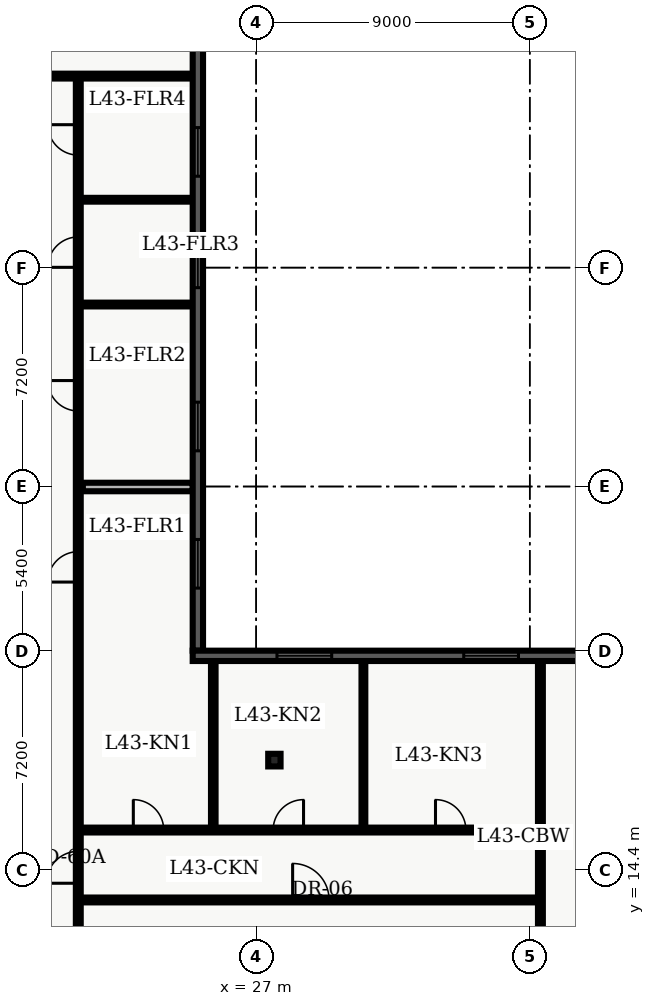
"""IFC4 building model, lengths in metres.
Left out: names, types, materials, properties, quantities, classifications, styles, units other than length and angle.
Written with IfcOpenShell. Run it as: python <this file> out.ifc"""

import sys

from ifc_helpers import new_model, entity, si_unit, converted_unit, direction, frame, origin_with_axes, origin_2d_with_axis, place, context, subcontext, project, spatial, polyline, rectangle, i_section, outline, extrude, element, fill, save


model = new_model("IFC4")
c1 = context("Model", 3, precision=1e-05, world=origin_with_axes(), true_north=direction((0.0, 1.0)))
c2 = subcontext(c1, "Body", "Model", "MODEL_VIEW")
j1 = project(units=[si_unit("LENGTHUNIT", "METRE"), converted_unit("PLANEANGLEUNIT", "DEGREE", entity("IfcPlaneAngleMeasure", 0.017), si_unit("PLANEANGLEUNIT", "RADIAN"), dimensions=[0, 0, 0, 0, 0, 0, 0])], contexts=[c1])
p1 = place(None, origin_with_axes())
s1 = spatial("IfcSite", under=j1, at=p1, CompositionType="ELEMENT")
p2 = place(p1, origin_with_axes())
s2 = spatial("IfcBuilding", under=s1, at=p2, CompositionType="ELEMENT")
p3 = place(p2, frame((0.0, 0.0, 175.8), z_axis=(0.0, 0.0, 1.0), x_axis=(1.0, 0.0, 0.0)))
s3 = spatial("IfcBuildingStorey", under=s2, at=p3, CompositionType="ELEMENT", Elevation=175.8)
p4 = place(p3, frame((27.6, 18.0, 0.0), z_axis=(0.0, 0.0, 1.0), x_axis=(1.0, 0.0, 0.0)))
e1 = element("IfcColumn", 1, at=p4, inside=s3, PredefinedType="COLUMN", context=c2, shape_type="SweptSolid", body=[
    extrude(i_section(OverallWidth=0.406, OverallDepth=0.416, WebThickness=0.03, FlangeThickness=0.048, FilletRadius=0.022, at=origin_2d_with_axis()), origin_with_axes(), (0.0, 0.0, 1.0), 3.9),
])
p5 = place(p3, frame((2.6, 40.5, 0.0), z_axis=(0.0, 0.0, 1.0), x_axis=(1.0, 0.0, 0.0)))
e2 = element("IfcWall", 2, at=p5, inside=s3, PredefinedType="PARTITIONING", context=c2, shape_type="SweptSolid", body=[
    extrude(outline(polyline([(0.0, -0.08), (22.318, -0.08), (22.318, 0.08), (0.0, 0.08), (0.0, -0.08)])), origin_with_axes(), (0.0, 0.0, 1.0), 2.7),
])
p6 = place(p5, frame((2.368, 0.0, 0.0), z_axis=(0.0, 0.0, 1.0), x_axis=(1.0, 0.0, 0.0)))
e3 = element("IfcOpeningElement", 3, at=p6, cuts=e2, PredefinedType="OPENING", context=c2, shape_type="SweptSolid", body=[
    extrude(rectangle(XDim=1.0, YDim=0.18, at=origin_2d_with_axis()), origin_with_axes(), (0.0, 0.0, 1.0), 2.15),
])
p7 = place(p5, frame((7.617, 0.0, 0.0), z_axis=(0.0, 0.0, 1.0), x_axis=(1.0, 0.0, 0.0)))
e4 = element("IfcOpeningElement", 4, at=p7, cuts=e2, PredefinedType="OPENING", context=c2, shape_type="SweptSolid", body=[
    extrude(rectangle(XDim=1.0, YDim=0.18, at=origin_2d_with_axis()), origin_with_axes(), (0.0, 0.0, 1.0), 2.15),
])
p8 = place(p5, frame((14.004, 0.0, 0.0), z_axis=(0.0, 0.0, 1.0), x_axis=(1.0, 0.0, 0.0)))
e5 = element("IfcOpeningElement", 5, at=p8, cuts=e2, PredefinedType="OPENING", context=c2, shape_type="SweptSolid", body=[
    extrude(rectangle(XDim=1.0, YDim=0.18, at=origin_2d_with_axis()), origin_with_axes(), (0.0, 0.0, 1.0), 2.15),
])
p9 = place(p3, frame((21.15, 7.8, 0.0), z_axis=(0.0, 0.0, 1.0), x_axis=(0.0, 1.0, 0.0)))
e6 = element("IfcWall", 6, at=p9, inside=s3, PredefinedType="PARTITIONING", context=c2, shape_type="SweptSolid", body=[
    extrude(outline(polyline([(0.0, -0.08), (32.7, -0.08), (32.7, 0.08), (0.0, 0.08), (0.0, -0.08)])), origin_with_axes(), (0.0, 0.0, 1.0), 2.7),
])
p10 = place(p9, frame((16.557, 0.0, 0.0), z_axis=(0.0, 0.0, 1.0), x_axis=(1.0, 0.0, 0.0)))
e7 = element("IfcOpeningElement", 7, at=p10, cuts=e6, PredefinedType="OPENING", context=c2, shape_type="SweptSolid", body=[
    extrude(rectangle(XDim=1.0, YDim=0.18, at=origin_2d_with_axis()), origin_with_axes(), (0.0, 0.0, 1.0), 2.15),
])
p11 = place(p9, frame((22.185, 0.0, 0.0), z_axis=(0.0, 0.0, 1.0), x_axis=(1.0, 0.0, 0.0)))
e8 = element("IfcOpeningElement", 8, at=p11, cuts=e6, PredefinedType="OPENING", context=c2, shape_type="SweptSolid", body=[
    extrude(rectangle(XDim=1.0, YDim=0.18, at=origin_2d_with_axis()), origin_with_axes(), (0.0, 0.0, 1.0), 2.15),
])
p12 = place(p9, frame((26.91, 0.0, 0.0), z_axis=(0.0, 0.0, 1.0), x_axis=(1.0, 0.0, 0.0)))
e9 = element("IfcOpeningElement", 9, at=p12, cuts=e6, PredefinedType="OPENING", context=c2, shape_type="SweptSolid", body=[
    extrude(rectangle(XDim=1.0, YDim=0.18, at=origin_2d_with_axis()), origin_with_axes(), (0.0, 0.0, 1.0), 2.15),
])
p13 = place(p9, frame((30.602, 0.0, 0.0), z_axis=(0.0, 0.0, 1.0), x_axis=(1.0, 0.0, 0.0)))
e10 = element("IfcOpeningElement", 10, at=p13, cuts=e6, PredefinedType="OPENING", context=c2, shape_type="SweptSolid", body=[
    extrude(rectangle(XDim=1.0, YDim=0.18, at=origin_2d_with_axis()), origin_with_axes(), (0.0, 0.0, 1.0), 2.15),
])
p14 = place(p9, frame((6.675, 0.0, 0.0), z_axis=(0.0, 0.0, 1.0), x_axis=(1.0, 0.0, 0.0)))
e11 = element("IfcOpeningElement", 11, at=p14, cuts=e6, PredefinedType="OPENING", context=c2, shape_type="SweptSolid", body=[
    extrude(rectangle(XDim=1.05, YDim=0.18, at=origin_2d_with_axis()), origin_with_axes(), (0.0, 0.0, 1.0), 2.15),
])
p15 = place(p3, frame((21.3, 26.984, 0.0), z_axis=(0.0, 0.0, 1.0), x_axis=(1.0, 0.0, 0.0)))
e12 = element("IfcWall", 12, at=p15, inside=s3, PredefinedType="PARTITIONING", context=c2, shape_type="SweptSolid", body=[
    extrude(outline(polyline([(0.0, -0.14), (3.618, -0.14), (3.618, 0.14), (0.0, 0.14), (0.0, -0.14)])), origin_with_axes(), (0.0, 0.0, 1.0), 2.7),
])
for number, where, z_axis, x_axis in (
    (13, (21.3, 32.986, 0.0), (0.0, 0.0, 1.0), (1.0, 0.0, 0.0)),
    (14, (21.3, 36.433, 0.0), (0.0, 0.0, 1.0), (1.0, 0.0, 0.0)),
):
    element("IfcWall", number, at=place(p3, frame(where, z_axis=z_axis, x_axis=x_axis)), inside=s3, PredefinedType="PARTITIONING", context=c2, shape_type="SweptSolid", body=[
        extrude(outline(polyline([(0.0, -0.062), (3.618, -0.062), (3.618, 0.062), (0.0, 0.062), (0.0, -0.062)])), origin_with_axes(), (0.0, 0.0, 1.0), 2.7),
    ])
p16 = place(p3, frame((21.15, 13.4, 0.0), z_axis=(0.0, 0.0, 1.0), x_axis=(1.0, 0.0, 0.0)))
e15 = element("IfcWall", 15, at=p16, inside=s3, PredefinedType="PARTITIONING", context=c2, shape_type="SweptSolid", body=[
    extrude(outline(polyline([(0.0, -0.08), (15.2, -0.08), (15.2, 0.08), (0.0, 0.08), (0.0, -0.08)])), origin_with_axes(), (0.0, 0.0, 1.0), 2.7),
])
p17 = place(p16, frame((7.65, 0.0, 0.0), z_axis=(0.0, 0.0, 1.0), x_axis=(1.0, 0.0, 0.0)))
e16 = element("IfcOpeningElement", 16, at=p17, cuts=e15, PredefinedType="OPENING", context=c2, shape_type="SweptSolid", body=[
    extrude(rectangle(XDim=1.2, YDim=0.18, at=origin_2d_with_axis()), origin_with_axes(), (0.0, 0.0, 1.0), 2.2),
])
p18 = place(p3, frame((21.15, 15.7, 0.0), z_axis=(0.0, 0.0, 1.0), x_axis=(1.0, 0.0, 0.0)))
e17 = element("IfcWall", 17, at=p18, inside=s3, PredefinedType="PARTITIONING", context=c2, shape_type="SweptSolid", body=[
    extrude(outline(polyline([(0.0, -0.08), (15.2, -0.08), (15.2, 0.08), (0.0, 0.08), (0.0, -0.08)])), origin_with_axes(), (0.0, 0.0, 1.0), 2.7),
])
p19 = place(p18, frame((2.31, 0.0, 0.0), z_axis=(0.0, 0.0, 1.0), x_axis=(1.0, 0.0, 0.0)))
e18 = element("IfcOpeningElement", 18, at=p19, cuts=e17, PredefinedType="OPENING", context=c2, shape_type="SweptSolid", body=[
    extrude(rectangle(XDim=1.0, YDim=0.18, at=origin_2d_with_axis()), origin_with_axes(), (0.0, 0.0, 1.0), 2.15),
])
p20 = place(p18, frame((6.909, 0.0, 0.0), z_axis=(0.0, 0.0, 1.0), x_axis=(1.0, 0.0, 0.0)))
e19 = element("IfcOpeningElement", 19, at=p20, cuts=e17, PredefinedType="OPENING", context=c2, shape_type="SweptSolid", body=[
    extrude(rectangle(XDim=1.0, YDim=0.18, at=origin_2d_with_axis()), origin_with_axes(), (0.0, 0.0, 1.0), 2.15),
])
p21 = place(p18, frame((12.249, 0.0, 0.0), z_axis=(0.0, 0.0, 1.0), x_axis=(1.0, 0.0, 0.0)))
e20 = element("IfcOpeningElement", 20, at=p21, cuts=e17, PredefinedType="OPENING", context=c2, shape_type="SweptSolid", body=[
    extrude(rectangle(XDim=1.0, YDim=0.18, at=origin_2d_with_axis()), origin_with_axes(), (0.0, 0.0, 1.0), 2.15),
])
p22 = place(p3, frame((36.35, 4.35, 0.0), z_axis=(0.0, 0.0, 1.0), x_axis=(0.0, 1.0, 0.0)))
e21 = element("IfcWall", 21, at=p22, inside=s3, PredefinedType="PARTITIONING", context=c2, shape_type="SweptSolid", body=[
    extrude(outline(polyline([(0.0, -0.08), (16.95, -0.08), (16.95, 0.08), (0.0, 0.08), (0.0, -0.08)])), origin_with_axes(), (0.0, 0.0, 1.0), 2.7),
])
p23 = place(p3, frame((25.59, 15.82, 0.0), z_axis=(0.0, 0.0, 1.0), x_axis=(0.0, 1.0, 0.0)))
e22 = element("IfcWall", 22, at=p23, inside=s3, PredefinedType="PARTITIONING", context=c2, shape_type="SweptSolid", body=[
    extrude(outline(polyline([(0.0, -0.075), (5.445, -0.075), (5.445, 0.075), (0.0, 0.075), (0.0, -0.075)])), origin_with_axes(), (0.0, 0.0, 1.0), 2.7),
])
p24 = place(p3, frame((30.528, 15.82, 0.0), z_axis=(0.0, 0.0, 1.0), x_axis=(0.0, 1.0, 0.0)))
e23 = element("IfcWall", 23, at=p24, inside=s3, PredefinedType="PARTITIONING", context=c2, shape_type="SweptSolid", body=[
    extrude(outline(polyline([(0.0, -0.062), (5.445, -0.062), (5.445, 0.062), (0.0, 0.062), (0.0, -0.062)])), origin_with_axes(), (0.0, 0.0, 1.0), 2.7),
])
p25 = place(p3, frame((25.083, 45.38, 0.0), z_axis=(0.0, 0.0, 1.0), x_axis=(0.0, -1.0, 0.0)))
e24 = element("IfcWall", 24, at=p25, inside=s3, PredefinedType="SOLIDWALL", context=c2, shape_type="SweptSolid", body=[
    extrude(outline(polyline([(0.0, -0.17), (23.78, -0.17), (23.78, 0.17), (0.0, 0.17), (0.0, -0.17)])), origin_with_axes(), (0.0, 0.0, 1.0), 3.66),
])
p26 = place(p25, frame((2.858, 0.0, 0.45), z_axis=(0.0, 0.0, 1.0), x_axis=(1.0, 0.0, 0.0)))
e25 = element("IfcOpeningElement", 25, at=p26, cuts=e24, PredefinedType="OPENING", context=c2, shape_type="SweptSolid", body=[
    extrude(rectangle(XDim=1.6, YDim=0.36, at=origin_2d_with_axis()), origin_with_axes(), (0.0, 0.0, 1.0), 2.2),
])
p27 = place(p25, frame((7.374, 0.0, 0.45), z_axis=(0.0, 0.0, 1.0), x_axis=(1.0, 0.0, 0.0)))
e26 = element("IfcOpeningElement", 26, at=p27, cuts=e24, PredefinedType="OPENING", context=c2, shape_type="SweptSolid", body=[
    extrude(rectangle(XDim=1.6, YDim=0.36, at=origin_2d_with_axis()), origin_with_axes(), (0.0, 0.0, 1.0), 2.2),
])
p28 = place(p25, frame((11.04, 0.0, 0.45), z_axis=(0.0, 0.0, 1.0), x_axis=(1.0, 0.0, 0.0)))
e27 = element("IfcOpeningElement", 27, at=p28, cuts=e24, PredefinedType="OPENING", context=c2, shape_type="SweptSolid", body=[
    extrude(rectangle(XDim=1.6, YDim=0.36, at=origin_2d_with_axis()), origin_with_axes(), (0.0, 0.0, 1.0), 2.2),
])
p29 = place(p25, frame((16.406, 0.0, 0.45), z_axis=(0.0, 0.0, 1.0), x_axis=(1.0, 0.0, 0.0)))
e28 = element("IfcOpeningElement", 28, at=p29, cuts=e24, PredefinedType="OPENING", context=c2, shape_type="SweptSolid", body=[
    extrude(rectangle(XDim=1.6, YDim=0.36, at=origin_2d_with_axis()), origin_with_axes(), (0.0, 0.0, 1.0), 2.2),
])
p30 = place(p25, frame((20.922, 0.0, 0.45), z_axis=(0.0, 0.0, 1.0), x_axis=(1.0, 0.0, 0.0)))
e29 = element("IfcOpeningElement", 29, at=p30, cuts=e24, PredefinedType="OPENING", context=c2, shape_type="SweptSolid", body=[
    extrude(rectangle(XDim=1.6, YDim=0.36, at=origin_2d_with_axis()), origin_with_axes(), (0.0, 0.0, 1.0), 2.2),
])
p31 = place(p3, frame((24.913, 21.43, 0.0), z_axis=(0.0, 0.0, 1.0), x_axis=(1.0, 0.0, 0.0)))
e30 = element("IfcWall", 30, at=p31, inside=s3, PredefinedType="SOLIDWALL", context=c2, shape_type="SweptSolid", body=[
    extrude(outline(polyline([(0.0, -0.17), (13.487, -0.17), (13.487, 0.17), (0.0, 0.17), (0.0, -0.17)])), origin_with_axes(), (0.0, 0.0, 1.0), 3.66),
])
p32 = place(p31, frame((3.672, 0.0, 0.45), z_axis=(0.0, 0.0, 1.0), x_axis=(1.0, 0.0, 0.0)))
e31 = element("IfcOpeningElement", 31, at=p32, cuts=e30, PredefinedType="OPENING", context=c2, shape_type="SweptSolid", body=[
    extrude(rectangle(XDim=1.8, YDim=0.36, at=origin_2d_with_axis()), origin_with_axes(), (0.0, 0.0, 1.0), 2.1),
])
p33 = place(p31, frame((9.815, 0.0, 0.45), z_axis=(0.0, 0.0, 1.0), x_axis=(1.0, 0.0, 0.0)))
e32 = element("IfcOpeningElement", 32, at=p33, cuts=e30, PredefinedType="OPENING", context=c2, shape_type="SweptSolid", body=[
    extrude(rectangle(XDim=1.8, YDim=0.36, at=origin_2d_with_axis()), origin_with_axes(), (0.0, 0.0, 1.0), 2.1),
])
p34 = place(p9, frame((16.557, 0.0, 0.0), z_axis=(0.0, 0.0, 1.0), x_axis=(1.0, 0.0, 0.0)))
e33 = element("IfcDoor", 33, at=p34, inside=s3, OperationType="SINGLE_SWING_LEFT", PredefinedType="DOOR", context=c2, shape_type="SweptSolid", body=[
    extrude(rectangle(XDim=1.0, YDim=0.09, at=origin_2d_with_axis()), origin_with_axes(), (0.0, 0.0, 1.0), 2.15),
])
fill(e7, e33)
p35 = place(p9, frame((22.185, 0.0, 0.0), z_axis=(0.0, 0.0, 1.0), x_axis=(1.0, 0.0, 0.0)))
e34 = element("IfcDoor", 34, at=p35, inside=s3, OperationType="SINGLE_SWING_RIGHT", PredefinedType="DOOR", context=c2, shape_type="SweptSolid", body=[
    extrude(rectangle(XDim=1.0, YDim=0.09, at=origin_2d_with_axis()), origin_with_axes(), (0.0, 0.0, 1.0), 2.15),
])
fill(e8, e34)
p36 = place(p9, frame((26.91, 0.0, 0.0), z_axis=(0.0, 0.0, 1.0), x_axis=(1.0, 0.0, 0.0)))
e35 = element("IfcDoor", 35, at=p36, inside=s3, OperationType="SINGLE_SWING_LEFT", PredefinedType="DOOR", context=c2, shape_type="SweptSolid", body=[
    extrude(rectangle(XDim=1.0, YDim=0.09, at=origin_2d_with_axis()), origin_with_axes(), (0.0, 0.0, 1.0), 2.15),
])
fill(e9, e35)
p37 = place(p9, frame((30.602, 0.0, 0.0), z_axis=(0.0, 0.0, 1.0), x_axis=(1.0, 0.0, 0.0)))
e36 = element("IfcDoor", 36, at=p37, inside=s3, OperationType="SINGLE_SWING_RIGHT", PredefinedType="DOOR", context=c2, shape_type="SweptSolid", body=[
    extrude(rectangle(XDim=1.0, YDim=0.09, at=origin_2d_with_axis()), origin_with_axes(), (0.0, 0.0, 1.0), 2.15),
])
fill(e10, e36)
p38 = place(p9, frame((6.675, 0.0, 0.0), z_axis=(0.0, 0.0, 1.0), x_axis=(1.0, 0.0, 0.0)))
e37 = element("IfcDoor", 37, at=p38, inside=s3, OperationType="SINGLE_SWING_LEFT", PredefinedType="DOOR", context=c2, shape_type="SweptSolid", body=[
    extrude(rectangle(XDim=1.05, YDim=0.09, at=origin_2d_with_axis()), origin_with_axes(), (0.0, 0.0, 1.0), 2.15),
])
fill(e11, e37)
p39 = place(p16, frame((7.65, 0.0, 0.0), z_axis=(0.0, 0.0, 1.0), x_axis=(1.0, 0.0, 0.0)))
e38 = element("IfcDoor", 38, at=p39, inside=s3, OperationType="SINGLE_SWING_LEFT", PredefinedType="DOOR", context=c2, shape_type="SweptSolid", body=[
    extrude(rectangle(XDim=1.2, YDim=0.09, at=origin_2d_with_axis()), origin_with_axes(), (0.0, 0.0, 1.0), 2.2),
])
fill(e16, e38)
p40 = place(p18, frame((2.31, 0.0, 0.0), z_axis=(0.0, 0.0, 1.0), x_axis=(1.0, 0.0, 0.0)))
e39 = element("IfcDoor", 39, at=p40, inside=s3, OperationType="SINGLE_SWING_LEFT", PredefinedType="DOOR", context=c2, shape_type="SweptSolid", body=[
    extrude(rectangle(XDim=1.0, YDim=0.09, at=origin_2d_with_axis()), origin_with_axes(), (0.0, 0.0, 1.0), 2.15),
])
fill(e18, e39)
p41 = place(p18, frame((6.909, 0.0, 0.0), z_axis=(0.0, 0.0, 1.0), x_axis=(1.0, 0.0, 0.0)))
e40 = element("IfcDoor", 40, at=p41, inside=s3, OperationType="SINGLE_SWING_RIGHT", PredefinedType="DOOR", context=c2, shape_type="SweptSolid", body=[
    extrude(rectangle(XDim=1.0, YDim=0.09, at=origin_2d_with_axis()), origin_with_axes(), (0.0, 0.0, 1.0), 2.15),
])
fill(e19, e40)
p42 = place(p18, frame((12.249, 0.0, 0.0), z_axis=(0.0, 0.0, 1.0), x_axis=(1.0, 0.0, 0.0)))
e41 = element("IfcDoor", 41, at=p42, inside=s3, OperationType="SINGLE_SWING_LEFT", PredefinedType="DOOR", context=c2, shape_type="SweptSolid", body=[
    extrude(rectangle(XDim=1.0, YDim=0.09, at=origin_2d_with_axis()), origin_with_axes(), (0.0, 0.0, 1.0), 2.15),
])
fill(e20, e41)
p43 = place(p25, frame((7.374, 0.0, 0.45), z_axis=(0.0, 0.0, 1.0), x_axis=(1.0, 0.0, 0.0)))
e42 = element("IfcWindow", 42, at=p43, inside=s3, PredefinedType="WINDOW", context=c2, shape_type="SweptSolid", body=[
    extrude(rectangle(XDim=1.6, YDim=0.09, at=origin_2d_with_axis()), origin_with_axes(), (0.0, 0.0, 1.0), 2.2),
])
fill(e26, e42)
p44 = place(p25, frame((11.04, 0.0, 0.45), z_axis=(0.0, 0.0, 1.0), x_axis=(1.0, 0.0, 0.0)))
e43 = element("IfcWindow", 43, at=p44, inside=s3, PredefinedType="WINDOW", context=c2, shape_type="SweptSolid", body=[
    extrude(rectangle(XDim=1.6, YDim=0.09, at=origin_2d_with_axis()), origin_with_axes(), (0.0, 0.0, 1.0), 2.2),
])
fill(e27, e43)
p45 = place(p25, frame((16.406, 0.0, 0.45), z_axis=(0.0, 0.0, 1.0), x_axis=(1.0, 0.0, 0.0)))
e44 = element("IfcWindow", 44, at=p45, inside=s3, PredefinedType="WINDOW", context=c2, shape_type="SweptSolid", body=[
    extrude(rectangle(XDim=1.6, YDim=0.09, at=origin_2d_with_axis()), origin_with_axes(), (0.0, 0.0, 1.0), 2.2),
])
fill(e28, e44)
p46 = place(p25, frame((20.922, 0.0, 0.45), z_axis=(0.0, 0.0, 1.0), x_axis=(1.0, 0.0, 0.0)))
e45 = element("IfcWindow", 45, at=p46, inside=s3, PredefinedType="WINDOW", context=c2, shape_type="SweptSolid", body=[
    extrude(rectangle(XDim=1.6, YDim=0.09, at=origin_2d_with_axis()), origin_with_axes(), (0.0, 0.0, 1.0), 2.2),
])
fill(e29, e45)
p47 = place(p31, frame((3.672, 0.0, 0.45), z_axis=(0.0, 0.0, 1.0), x_axis=(1.0, 0.0, 0.0)))
e46 = element("IfcWindow", 46, at=p47, inside=s3, PredefinedType="WINDOW", context=c2, shape_type="SweptSolid", body=[
    extrude(rectangle(XDim=1.8, YDim=0.09, at=origin_2d_with_axis()), origin_with_axes(), (0.0, 0.0, 1.0), 2.1),
])
fill(e31, e46)
p48 = place(p31, frame((9.815, 0.0, 0.45), z_axis=(0.0, 0.0, 1.0), x_axis=(1.0, 0.0, 0.0)))
e47 = element("IfcWindow", 47, at=p48, inside=s3, PredefinedType="WINDOW", context=c2, shape_type="SweptSolid", body=[
    extrude(rectangle(XDim=1.8, YDim=0.09, at=origin_2d_with_axis()), origin_with_axes(), (0.0, 0.0, 1.0), 2.1),
])
fill(e32, e47)
save(model, sys.argv[1])
